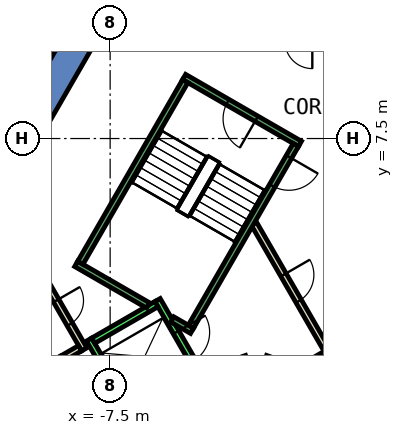
"""IFC4 building model, lengths in metres.
Left out: names, types, materials, properties, quantities, classifications, styles, units other than length and angle.
Written with IfcOpenShell. Run it as: python <this file> out.ifc"""

import sys

from ifc_helpers import new_model, si_unit, direction, frame, frame_2d, origin, place, context, subcontext, project, spatial, polyline, rectangle, outline, extrude, element, fill, save


model = new_model("IFC4")
c1 = context("Model", 3, precision=1e-05, world=origin(), true_north=direction((0.0, 1.0)))
c2 = subcontext(c1, "Body", "Model", "MODEL_VIEW")
j1 = project(units=[si_unit("LENGTHUNIT", "METRE"), si_unit("PLANEANGLEUNIT", "RADIAN")], contexts=[c1])
p1 = place(None, origin())
s1 = spatial("IfcSite", under=j1, at=p1, CompositionType="ELEMENT")
p2 = place(p1, origin())
s2 = spatial("IfcBuilding", under=s1, at=p2, CompositionType="ELEMENT")
p3 = place(p2, frame((0.0, 0.0, -16.5)))
s3 = spatial("IfcBuildingStorey", under=s2, at=p3, CompositionType="ELEMENT", Elevation=-16.5)
p4 = place(p3, origin())
e1 = element("IfcWall", 1, at=p4, inside=s3, PredefinedType="SHEAR", context=c2, shape_type="SweptSolid", body=[
    extrude(outline(polyline([(-12.267, 5.252), (-11.402, 4.752), (-6.351, 13.5), (-6.928, 14.5), (-12.267, 5.252)])), origin(), (0.0, 0.0, 1.0), 5.08),
])
p5 = place(p3, origin())
e2 = element("IfcWall", 2, at=p5, inside=s3, PredefinedType="SHEAR", context=c2, shape_type="SweptSolid", body=[
    extrude(outline(polyline([(-13.856, 2.5), (-6.928, -9.5), (-6.351, -8.5), (-12.702, 2.5), (-13.856, 2.5)])), origin(), (0.0, 0.0, 1.0), 5.08),
])
p6 = place(p3, frame((-12.799, 8.33, 0.0), z_axis=(0.0, 0.0, 1.0), x_axis=(0.499923440311, 0.86606960103, 0.0)))
e3 = element("IfcWall", 3, at=p6, inside=s3, PredefinedType="PARTITIONING", context=c2, shape_type="SweptSolid", body=[
    extrude(rectangle(XDim=9.534, YDim=0.2, at=frame_2d((4.767, 0.0))), origin(), (0.0, 0.0, 1.0), 5.08),
])
p7 = place(p6, frame((5.766, 0.0, 0.0)))
e4 = element("IfcOpeningElement", 4, at=p7, cuts=e3, PredefinedType="OPENING", context=c2, shape_type="SweptSolid", body=[
    extrude(rectangle(XDim=1.0, YDim=2.1, at=frame_2d((0.5, 1.05))), frame((0.0, 0.11, 0.0), z_axis=(0.0, -1.0, 0.0), x_axis=(1.0, 0.0, 0.0)), (0.0, 0.0, 1.0), 0.22),
])
p8 = place(p3, frame((-9.651, 2.817, 0.0), z_axis=(0.0, 0.0, 1.0), x_axis=(0.49989585183, -0.866085525409, 0.0)))
e5 = element("IfcWall", 5, at=p8, inside=s3, PredefinedType="PARTITIONING", context=c2, shape_type="SweptSolid", body=[
    extrude(rectangle(XDim=2.6, YDim=0.2, at=frame_2d((1.3, 0.0))), origin(), (0.0, 0.0, 1.0), 5.08),
])
p9 = place(p8, frame((0.75, 0.0, 0.0)))
e6 = element("IfcOpeningElement", 6, at=p9, cuts=e5, PredefinedType="OPENING", context=c2, shape_type="SweptSolid", body=[
    extrude(rectangle(XDim=0.9, YDim=2.1, at=frame_2d((0.45, 1.05))), frame((0.0, 0.11, 0.0), z_axis=(0.0, -1.0, 0.0), x_axis=(1.0, 0.0, 0.0)), (0.0, 0.0, 1.0), 0.22),
])
p10 = place(p3, frame((-8.488, 0.602, 0.0), z_axis=(0.0, 0.0, 1.0), x_axis=(-0.865871789474, -0.500265973451, 0.0)))
e7 = element("IfcWall", 7, at=p10, inside=s3, PredefinedType="PARTITIONING", context=c2, shape_type="SweptSolid", body=[
    extrude(rectangle(XDim=0.7, YDim=0.2, at=frame_2d((0.35, 0.0))), origin(), (0.0, 0.0, 1.0), 5.08),
])
p11 = place(p3, frame((-0.52, -1.0, 0.0), z_axis=(0.0, 0.0, 1.0), x_axis=(0.50011622646, 0.865958290007, 0.0)))
e8 = element("IfcWall", 8, at=p11, inside=s3, PredefinedType="PARTITIONING", context=c2, shape_type="SweptSolid", body=[
    extrude(rectangle(XDim=4.991, YDim=0.2, at=frame_2d((2.496, 0.0))), origin(), (0.0, 0.0, 1.0), 5.08),
])
p12 = place(p11, frame((1.945, 0.0, 0.0)))
e9 = element("IfcOpeningElement", 9, at=p12, cuts=e8, PredefinedType="OPENING", context=c2, shape_type="SweptSolid", body=[
    extrude(rectangle(XDim=1.0, YDim=2.1, at=frame_2d((0.5, 1.05))), frame((0.0, 0.11, 0.0), z_axis=(0.0, -1.0, 0.0), x_axis=(1.0, 0.0, 0.0)), (0.0, 0.0, 1.0), 0.22),
])
p13 = place(p3, frame((-0.412, 0.414, 0.0), z_axis=(0.0, 0.0, 1.0), x_axis=(-0.866017369001, -0.500013916395, 0.0)))
e10 = element("IfcWall", 10, at=p13, inside=s3, PredefinedType="PARTITIONING", context=c2, shape_type="SweptSolid", body=[
    extrude(rectangle(XDim=1.45, YDim=0.2, at=frame_2d((0.725, 0.0))), origin(), (0.0, 0.0, 1.0), 5.08),
])
p14 = place(p3, frame((-2.07, 0.16, 0.0), z_axis=(0.0, 0.0, 1.0), x_axis=(-0.942199461132, 0.335052496547, 0.0)))
e11 = element("IfcWall", 11, at=p14, inside=s3, PredefinedType="PARTITIONING", context=c2, shape_type="SweptSolid", body=[
    extrude(rectangle(XDim=0.337, YDim=0.2, at=frame_2d((0.169, 0.0))), origin(), (0.0, 0.0, 1.0), 5.08),
])
p15 = place(p3, frame((-3.012, 0.273, 0.0), z_axis=(0.0, 0.0, 1.0), x_axis=(-0.942280615813, -0.334824194261, 0.0)))
e12 = element("IfcWall", 12, at=p15, inside=s3, PredefinedType="PARTITIONING", context=c2, shape_type="SweptSolid", body=[
    extrude(rectangle(XDim=0.338, YDim=0.2, at=frame_2d((0.169, 0.0))), origin(), (0.0, 0.0, 1.0), 5.08),
])
p16 = place(p3, frame((-2.771, 4.7, 0.0), z_axis=(0.0, 0.0, 1.0), x_axis=(0.499969479948, -0.866043023828, 0.0)))
e13 = element("IfcWall", 13, at=p16, inside=s3, PredefinedType="PARTITIONING", context=c2, shape_type="SweptSolid", body=[
    extrude(rectangle(XDim=4.99, YDim=0.2, at=frame_2d((2.495, 0.0))), origin(), (0.0, 0.0, 1.0), 5.08),
])
p17 = place(p16, frame((1.945, 0.0, 0.0)))
e14 = element("IfcOpeningElement", 14, at=p17, cuts=e13, PredefinedType="OPENING", context=c2, shape_type="SweptSolid", body=[
    extrude(rectangle(XDim=1.0, YDim=2.1, at=frame_2d((0.5, 1.05))), frame((0.0, 0.11, 0.0), z_axis=(0.0, -1.0, 0.0), x_axis=(1.0, 0.0, 0.0)), (0.0, 0.0, 1.0), 0.22),
])
p18 = place(p3, frame((-5.94, 2.188, 0.0), z_axis=(0.0, 0.0, 1.0), x_axis=(0.49994636267, -0.866056369097, 0.0)))
e15 = element("IfcWall", 15, at=p18, inside=s3, PredefinedType="STANDARD", context=c2, shape_type="SweptSolid", body=[
    extrude(rectangle(XDim=2.8, YDim=0.2, at=frame_2d((1.4, 0.0))), origin(), (0.0, 0.0, 1.0), 5.08),
])
p19 = place(p18, frame((1.225, 0.0, 0.0)))
e16 = element("IfcOpeningElement", 16, at=p19, cuts=e15, PredefinedType="OPENING", context=c2, shape_type="SweptSolid", body=[
    extrude(rectangle(XDim=1.1, YDim=2.1, at=frame_2d((0.55, 1.05))), frame((0.0, 0.11, 0.0), z_axis=(0.0, -1.0, 0.0), x_axis=(1.0, 0.0, 0.0)), (0.0, 0.0, 1.0), 0.22),
])
p20 = place(p3, frame((-8.192, 0.888, 0.0), z_axis=(0.0, 0.0, 1.0), x_axis=(0.49994636267, -0.866056369097, 0.0)))
e17 = element("IfcWall", 17, at=p20, inside=s3, PredefinedType="STANDARD", context=c2, shape_type="SweptSolid", body=[
    extrude(rectangle(XDim=2.8, YDim=0.2, at=frame_2d((1.4, 0.0))), origin(), (0.0, 0.0, 1.0), 5.08),
])
p21 = place(p3, frame((-5.977, 2.052, 0.0), z_axis=(0.0, 0.0, 1.0), x_axis=(-0.865973769406, -0.500089422704, 0.0)))
e18 = element("IfcWall", 18, at=p21, inside=s3, PredefinedType="STANDARD", context=c2, shape_type="SweptSolid", body=[
    extrude(rectangle(XDim=2.399, YDim=0.2, at=frame_2d((1.2, 0.0))), origin(), (0.0, 0.0, 1.0), 5.08),
])
p22 = place(p3, frame((-1.256, 7.324, 0.0), z_axis=(0.0, 0.0, 1.0), x_axis=(-0.866046073146, 0.499964197906, 0.0)))
e19 = element("IfcWall", 19, at=p22, inside=s3, PredefinedType="STANDARD", context=c2, shape_type="SweptSolid", body=[
    extrude(rectangle(XDim=4.4, YDim=0.2, at=frame_2d((2.2, 0.0))), origin(), (0.0, 0.0, 1.0), 5.08),
])
p23 = place(p22, frame((1.65, 0.0, 0.0)))
e20 = element("IfcOpeningElement", 20, at=p23, cuts=e19, PredefinedType="OPENING", context=c2, shape_type="SweptSolid", body=[
    extrude(rectangle(XDim=1.1, YDim=2.2, at=frame_2d((0.55, 1.1))), frame((0.0, 0.11, 0.0), z_axis=(0.0, -1.0, 0.0), x_axis=(1.0, 0.0, 0.0)), (0.0, 0.0, 1.0), 0.22),
])
p24 = place(p3, frame((-6.25, 2.01, 0.0), z_axis=(0.0, 0.0, 1.0), x_axis=(-0.86611865017, 0.499838457731, 0.0)))
e21 = element("IfcWall", 21, at=p24, inside=s3, PredefinedType="STANDARD", context=c2, shape_type="SweptSolid", body=[
    extrude(rectangle(XDim=2.733, YDim=0.2, at=frame_2d((1.366, 0.0))), origin(), (0.0, 0.0, 1.0), 5.08),
])
p25 = place(p3, frame((-4.806, 1.176, 0.0), z_axis=(0.0, 0.0, 1.0), x_axis=(-0.866558586415, 0.499075361355, 0.0)))
e22 = element("IfcWall", 22, at=p25, inside=s3, PredefinedType="STANDARD", context=c2, shape_type="SweptSolid", body=[
    extrude(rectangle(XDim=0.751, YDim=0.2, at=frame_2d((0.376, 0.0))), origin(), (0.0, 0.0, 1.0), 5.08),
])
p26 = place(p3, frame((-1.393, 7.288, 0.0), z_axis=(0.0, 0.0, 1.0), x_axis=(-0.499963383562, -0.866046543262, 0.0)))
e23 = element("IfcWall", 23, at=p26, inside=s3, PredefinedType="STANDARD", context=c2, shape_type="SweptSolid", body=[
    extrude(rectangle(XDim=6.9, YDim=0.2, at=frame_2d((3.45, 0.0))), origin(), (0.0, 0.0, 1.0), 5.08),
])
p27 = place(p26, frame((0.45, 0.0, 0.0)))
e24 = element("IfcOpeningElement", 24, at=p27, cuts=e23, PredefinedType="OPENING", context=c2, shape_type="SweptSolid", body=[
    extrude(rectangle(XDim=1.1, YDim=2.2, at=frame_2d((0.55, 1.1))), frame((0.0, 0.11, 0.0), z_axis=(0.0, -1.0, 0.0), x_axis=(1.0, 0.0, 0.0)), (0.0, 0.0, 1.0), 0.22),
])
p28 = place(p3, frame((-5.03, 9.388, 0.0), z_axis=(0.0, 0.0, 1.0), x_axis=(-0.499978703459, -0.866037698999, 0.0)))
e25 = element("IfcWall", 25, at=p28, inside=s3, PredefinedType="STANDARD", context=c2, shape_type="SweptSolid", body=[
    extrude(rectangle(XDim=6.9, YDim=0.2, at=frame_2d((3.45, 0.0))), origin(), (0.0, 0.0, 1.0), 5.08),
])
p29 = place(p17, origin())
e26 = element("IfcDoor", 26, at=p29, inside=s3, OperationType="SINGLE_SWING_RIGHT", PredefinedType="DOOR", context=c2, shape_type="SweptSolid", body=[
    extrude(rectangle(XDim=1.0, YDim=2.1, at=frame_2d((0.5, 1.05))), frame((0.0, 0.025, 0.0), z_axis=(0.0, -1.0, 0.0), x_axis=(1.0, 0.0, 0.0)), (0.0, 0.0, 1.0), 0.05),
])
fill(e14, e26)
p30 = place(p9, origin())
e27 = element("IfcDoor", 27, at=p30, inside=s3, OperationType="SINGLE_SWING_RIGHT", PredefinedType="DOOR", context=c2, shape_type="SweptSolid", body=[
    extrude(rectangle(XDim=0.9, YDim=2.1, at=frame_2d((0.45, 1.05))), frame((0.0, 0.025, 0.0), z_axis=(0.0, -1.0, 0.0), x_axis=(1.0, 0.0, 0.0)), (0.0, 0.0, 1.0), 0.05),
])
fill(e6, e27)
p31 = place(p19, origin())
e28 = element("IfcDoor", 28, at=p31, inside=s3, OperationType="SLIDING_TO_LEFT", PredefinedType="DOOR", context=c2, shape_type="SweptSolid", body=[
    extrude(rectangle(XDim=1.1, YDim=2.1, at=frame_2d((0.55, 1.05))), frame((0.0, 0.025, 0.0), z_axis=(0.0, -1.0, 0.0), x_axis=(1.0, 0.0, 0.0)), (0.0, 0.0, 1.0), 0.05),
])
fill(e16, e28)
p32 = place(p27, origin())
e29 = element("IfcDoor", 29, at=p32, inside=s3, OperationType="SINGLE_SWING_LEFT", PredefinedType="DOOR", context=c2, shape_type="SweptSolid", body=[
    extrude(rectangle(XDim=1.1, YDim=2.2, at=frame_2d((0.55, 1.1))), frame((0.0, 0.025, 0.0), z_axis=(0.0, -1.0, 0.0), x_axis=(1.0, 0.0, 0.0)), (0.0, 0.0, 1.0), 0.05),
])
fill(e24, e29)
p33 = place(p23, origin())
e30 = element("IfcDoor", 30, at=p33, inside=s3, OperationType="SINGLE_SWING_LEFT", PredefinedType="DOOR", context=c2, shape_type="SweptSolid", body=[
    extrude(rectangle(XDim=1.1, YDim=2.2, at=frame_2d((0.55, 1.1))), frame((0.0, 0.025, 0.0), z_axis=(0.0, -1.0, 0.0), x_axis=(1.0, 0.0, 0.0)), (0.0, 0.0, 1.0), 0.05),
])
fill(e20, e30)
save(model, sys.argv[1])
